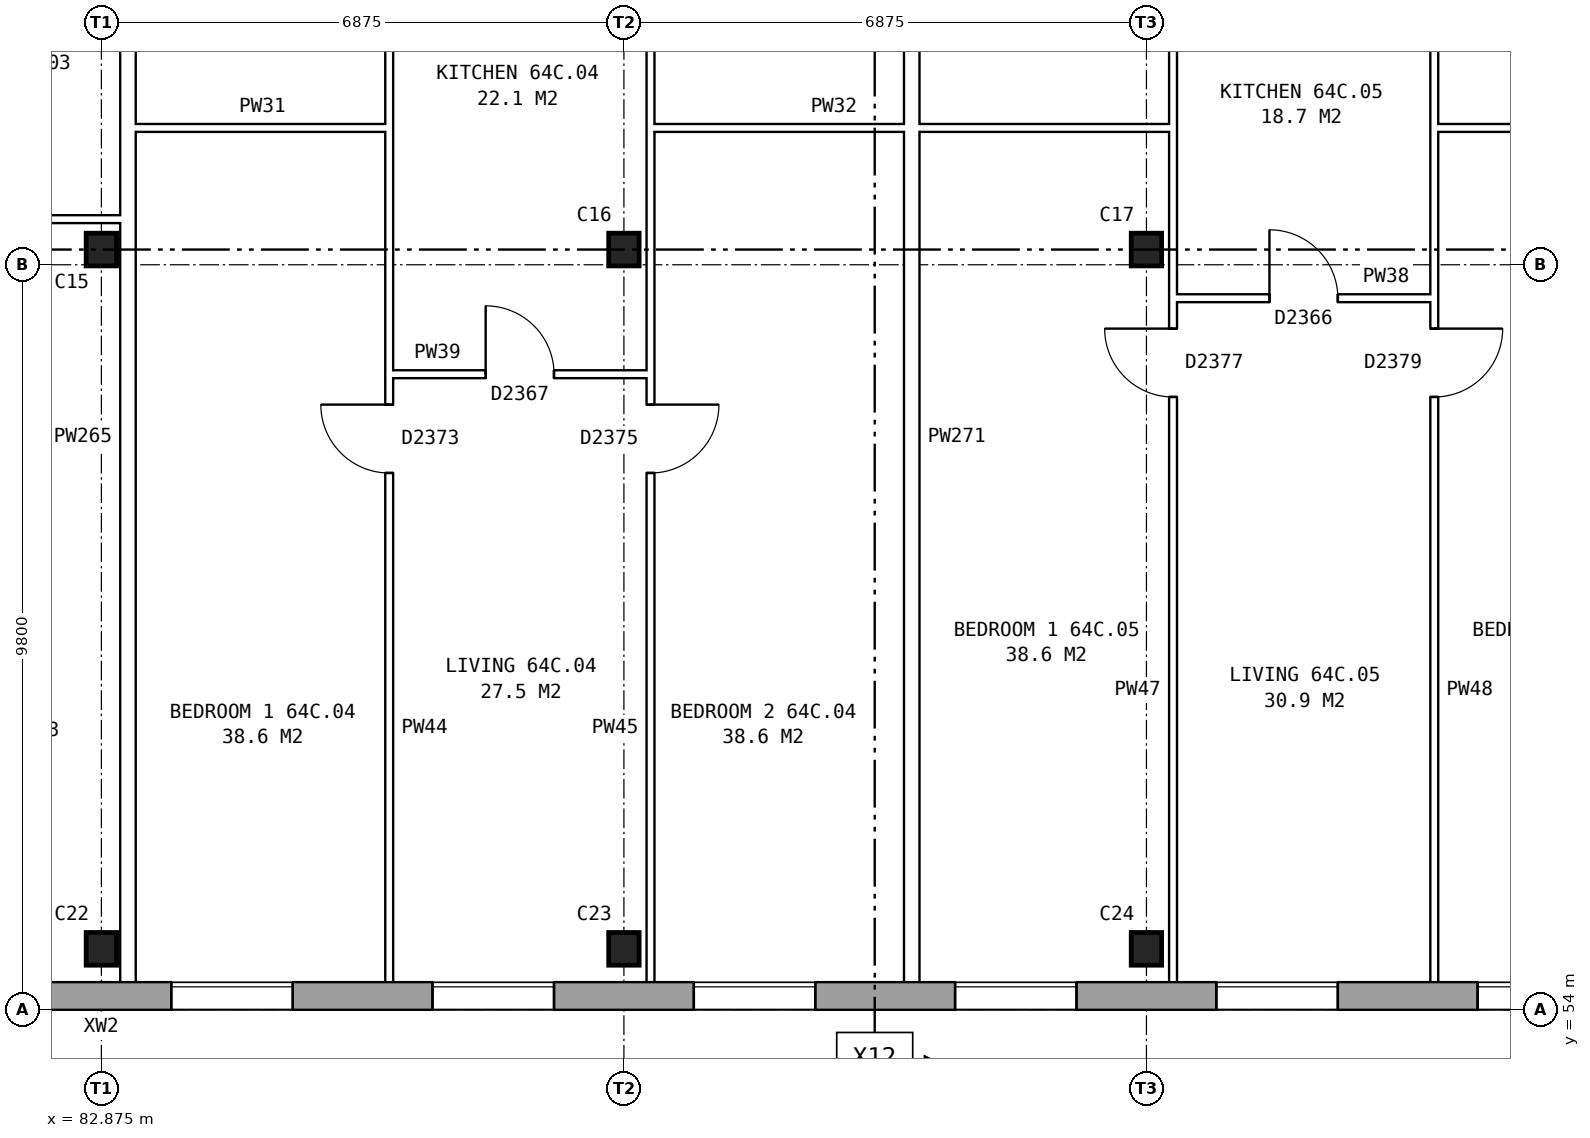
"""IFC4 building model, lengths in metres.
Left out: names, types, materials, properties, quantities, classifications, styles, units other than length and angle.
Written with IfcOpenShell. Run it as: python <this file> out.ifc"""

import sys

from ifc_helpers import new_model, si_unit, direction, frame, frame_2d, origin, origin_2d, place, context, subcontext, project, spatial, rectangle, i_section, extrude, element, fill, save


model = new_model("IFC4")
c1 = context("Model", 3, precision=1e-05, world=origin(), true_north=direction((0.0, 1.0)))
c2 = subcontext(c1, "Body", "Model", "MODEL_VIEW")
j1 = project(units=[si_unit("LENGTHUNIT", "METRE"), si_unit("PLANEANGLEUNIT", "RADIAN")], contexts=[c1])
p1 = place(None, origin())
s1 = spatial("IfcSite", under=j1, at=p1, CompositionType="ELEMENT")
p2 = place(p1, origin())
s2 = spatial("IfcBuilding", under=s1, at=p2, CompositionType="ELEMENT")
p3 = place(p2, frame((0.0, 0.0, 227.6)))
s3 = spatial("IfcBuildingStorey", under=s2, at=p3, CompositionType="ELEMENT", Elevation=227.6)
for number, where, z_axis, x_axis in (
    (1, (82.875, 54.8, 0.0), (0.0, 0.0, 1.0), (1.0, 0.0, 0.0)),
    (2, (89.75, 54.8, 0.0), (0.0, 0.0, 1.0), (1.0, 0.0, 0.0)),
    (3, (96.625, 54.8, 0.0), (0.0, 0.0, 1.0), (1.0, 0.0, 0.0)),
    (4, (82.875, 64.0, 0.0), (0.0, 0.0, 1.0), (1.0, 0.0, 0.0)),
    (5, (89.75, 64.0, 0.0), (0.0, 0.0, 1.0), (1.0, 0.0, 0.0)),
    (6, (96.625, 64.0, 0.0), (0.0, 0.0, 1.0), (1.0, 0.0, 0.0)),
):
    element("IfcColumn", number, at=place(p3, frame(where, z_axis=z_axis, x_axis=x_axis)), inside=s3, PredefinedType="COLUMN", context=c2, shape_type="SweptSolid", body=[
        extrude(i_section(OverallWidth=0.4, OverallDepth=0.43, WebThickness=0.04, FlangeThickness=0.04, at=origin_2d()), origin(), (0.0, 0.0, 1.0), 2.85),
    ])
p4 = place(p3, frame((75.95, 54.18, 0.0), z_axis=(0.0, 0.0, 1.0), x_axis=(1.0, 0.0, 0.0)))
e7 = element("IfcWall", 7, at=p4, inside=s3, PredefinedType="STANDARD", context=c2, shape_type="SweptSolid", body=[
    extrude(rectangle(XDim=55.1, YDim=0.36, at=frame_2d((27.55, 0.0))), origin(), (0.0, 0.0, 1.0), 2.85),
])
p5 = place(p4, frame((0.969, 0.0, 0.8)))
e8 = element("IfcOpeningElement", 8, at=p5, cuts=e7, PredefinedType="OPENING", context=c2, shape_type="SweptSolid", body=[
    extrude(rectangle(XDim=1.6, YDim=1.8, at=frame_2d((0.8, 0.9))), frame((0.0, 0.19, 0.0), z_axis=(0.0, -1.0, 0.0), x_axis=(1.0, 0.0, 0.0)), (0.0, 0.0, 1.0), 0.38),
])
p6 = place(p4, frame((4.406, 0.0, 0.8)))
e9 = element("IfcOpeningElement", 9, at=p6, cuts=e7, PredefinedType="OPENING", context=c2, shape_type="SweptSolid", body=[
    extrude(rectangle(XDim=1.6, YDim=1.8, at=frame_2d((0.8, 0.9))), frame((0.0, 0.19, 0.0), z_axis=(0.0, -1.0, 0.0), x_axis=(1.0, 0.0, 0.0)), (0.0, 0.0, 1.0), 0.38),
])
p7 = place(p4, frame((7.844, 0.0, 0.8)))
e10 = element("IfcOpeningElement", 10, at=p7, cuts=e7, PredefinedType="OPENING", context=c2, shape_type="SweptSolid", body=[
    extrude(rectangle(XDim=1.6, YDim=1.8, at=frame_2d((0.8, 0.9))), frame((0.0, 0.19, 0.0), z_axis=(0.0, -1.0, 0.0), x_axis=(1.0, 0.0, 0.0)), (0.0, 0.0, 1.0), 0.38),
])
p8 = place(p4, frame((11.281, 0.0, 0.8)))
e11 = element("IfcOpeningElement", 11, at=p8, cuts=e7, PredefinedType="OPENING", context=c2, shape_type="SweptSolid", body=[
    extrude(rectangle(XDim=1.6, YDim=1.8, at=frame_2d((0.8, 0.9))), frame((0.0, 0.19, 0.0), z_axis=(0.0, -1.0, 0.0), x_axis=(1.0, 0.0, 0.0)), (0.0, 0.0, 1.0), 0.38),
])
p9 = place(p4, frame((14.719, 0.0, 0.8)))
e12 = element("IfcOpeningElement", 12, at=p9, cuts=e7, PredefinedType="OPENING", context=c2, shape_type="SweptSolid", body=[
    extrude(rectangle(XDim=1.6, YDim=1.8, at=frame_2d((0.8, 0.9))), frame((0.0, 0.19, 0.0), z_axis=(0.0, -1.0, 0.0), x_axis=(1.0, 0.0, 0.0)), (0.0, 0.0, 1.0), 0.38),
])
p10 = place(p4, frame((18.156, 0.0, 0.8)))
e13 = element("IfcOpeningElement", 13, at=p10, cuts=e7, PredefinedType="OPENING", context=c2, shape_type="SweptSolid", body=[
    extrude(rectangle(XDim=1.6, YDim=1.8, at=frame_2d((0.8, 0.9))), frame((0.0, 0.19, 0.0), z_axis=(0.0, -1.0, 0.0), x_axis=(1.0, 0.0, 0.0)), (0.0, 0.0, 1.0), 0.38),
])
p11 = place(p4, frame((21.594, 0.0, 0.8)))
e14 = element("IfcOpeningElement", 14, at=p11, cuts=e7, PredefinedType="OPENING", context=c2, shape_type="SweptSolid", body=[
    extrude(rectangle(XDim=1.6, YDim=1.8, at=frame_2d((0.8, 0.9))), frame((0.0, 0.19, 0.0), z_axis=(0.0, -1.0, 0.0), x_axis=(1.0, 0.0, 0.0)), (0.0, 0.0, 1.0), 0.38),
])
p12 = place(p4, frame((25.031, 0.0, 0.8)))
e15 = element("IfcOpeningElement", 15, at=p12, cuts=e7, PredefinedType="OPENING", context=c2, shape_type="SweptSolid", body=[
    extrude(rectangle(XDim=1.6, YDim=1.8, at=frame_2d((0.8, 0.9))), frame((0.0, 0.19, 0.0), z_axis=(0.0, -1.0, 0.0), x_axis=(1.0, 0.0, 0.0)), (0.0, 0.0, 1.0), 0.38),
])
p13 = place(p4, frame((28.469, 0.0, 0.8)))
e16 = element("IfcOpeningElement", 16, at=p13, cuts=e7, PredefinedType="OPENING", context=c2, shape_type="SweptSolid", body=[
    extrude(rectangle(XDim=1.6, YDim=1.8, at=frame_2d((0.8, 0.9))), frame((0.0, 0.19, 0.0), z_axis=(0.0, -1.0, 0.0), x_axis=(1.0, 0.0, 0.0)), (0.0, 0.0, 1.0), 0.38),
])
p14 = place(p4, frame((31.906, 0.0, 0.8)))
e17 = element("IfcOpeningElement", 17, at=p14, cuts=e7, PredefinedType="OPENING", context=c2, shape_type="SweptSolid", body=[
    extrude(rectangle(XDim=1.6, YDim=1.8, at=frame_2d((0.8, 0.9))), frame((0.0, 0.19, 0.0), z_axis=(0.0, -1.0, 0.0), x_axis=(1.0, 0.0, 0.0)), (0.0, 0.0, 1.0), 0.38),
])
p15 = place(p4, frame((35.344, 0.0, 0.8)))
e18 = element("IfcOpeningElement", 18, at=p15, cuts=e7, PredefinedType="OPENING", context=c2, shape_type="SweptSolid", body=[
    extrude(rectangle(XDim=1.6, YDim=1.8, at=frame_2d((0.8, 0.9))), frame((0.0, 0.19, 0.0), z_axis=(0.0, -1.0, 0.0), x_axis=(1.0, 0.0, 0.0)), (0.0, 0.0, 1.0), 0.38),
])
p16 = place(p4, frame((38.781, 0.0, 0.8)))
e19 = element("IfcOpeningElement", 19, at=p16, cuts=e7, PredefinedType="OPENING", context=c2, shape_type="SweptSolid", body=[
    extrude(rectangle(XDim=1.6, YDim=1.8, at=frame_2d((0.8, 0.9))), frame((0.0, 0.19, 0.0), z_axis=(0.0, -1.0, 0.0), x_axis=(1.0, 0.0, 0.0)), (0.0, 0.0, 1.0), 0.38),
])
p17 = place(p4, frame((42.219, 0.0, 0.8)))
e20 = element("IfcOpeningElement", 20, at=p17, cuts=e7, PredefinedType="OPENING", context=c2, shape_type="SweptSolid", body=[
    extrude(rectangle(XDim=1.6, YDim=1.8, at=frame_2d((0.8, 0.9))), frame((0.0, 0.19, 0.0), z_axis=(0.0, -1.0, 0.0), x_axis=(1.0, 0.0, 0.0)), (0.0, 0.0, 1.0), 0.38),
])
p18 = place(p4, frame((45.656, 0.0, 0.8)))
e21 = element("IfcOpeningElement", 21, at=p18, cuts=e7, PredefinedType="OPENING", context=c2, shape_type="SweptSolid", body=[
    extrude(rectangle(XDim=1.6, YDim=1.8, at=frame_2d((0.8, 0.9))), frame((0.0, 0.19, 0.0), z_axis=(0.0, -1.0, 0.0), x_axis=(1.0, 0.0, 0.0)), (0.0, 0.0, 1.0), 0.38),
])
p19 = place(p4, frame((49.094, 0.0, 0.8)))
e22 = element("IfcOpeningElement", 22, at=p19, cuts=e7, PredefinedType="OPENING", context=c2, shape_type="SweptSolid", body=[
    extrude(rectangle(XDim=1.6, YDim=1.8, at=frame_2d((0.8, 0.9))), frame((0.0, 0.19, 0.0), z_axis=(0.0, -1.0, 0.0), x_axis=(1.0, 0.0, 0.0)), (0.0, 0.0, 1.0), 0.38),
])
p20 = place(p4, frame((52.531, 0.0, 0.8)))
e23 = element("IfcOpeningElement", 23, at=p20, cuts=e7, PredefinedType="OPENING", context=c2, shape_type="SweptSolid", body=[
    extrude(rectangle(XDim=1.6, YDim=1.8, at=frame_2d((0.8, 0.9))), frame((0.0, 0.19, 0.0), z_axis=(0.0, -1.0, 0.0), x_axis=(1.0, 0.0, 0.0)), (0.0, 0.0, 1.0), 0.38),
])
p21 = place(p3, frame((86.662, 62.36, 0.0), z_axis=(0.0, 0.0, 1.0), x_axis=(1.0, 0.0, 0.0)))
e24 = element("IfcWall", 24, at=p21, inside=s3, PredefinedType="PARTITIONING", context=c2, shape_type="SweptSolid", body=[
    extrude(rectangle(XDim=3.438, YDim=0.1, at=frame_2d((1.719, 0.0))), origin(), (0.0, 0.0, 1.0), 2.85),
])
p22 = place(p21, frame((1.269, 0.0, 0.0)))
e25 = element("IfcOpeningElement", 25, at=p22, cuts=e24, PredefinedType="OPENING", context=c2, shape_type="SweptSolid", body=[
    extrude(rectangle(XDim=0.9, YDim=2.1, at=frame_2d((0.45, 1.05))), frame((0.0, 0.06, 0.0), z_axis=(0.0, -1.0, 0.0), x_axis=(1.0, 0.0, 0.0)), (0.0, 0.0, 1.0), 0.12),
])
p23 = place(p3, frame((96.975, 63.36, 0.0), z_axis=(0.0, 0.0, 1.0), x_axis=(1.0, 0.0, 0.0)))
e26 = element("IfcWall", 26, at=p23, inside=s3, PredefinedType="PARTITIONING", context=c2, shape_type="SweptSolid", body=[
    extrude(rectangle(XDim=3.437, YDim=0.1, at=frame_2d((1.719, 0.0))), origin(), (0.0, 0.0, 1.0), 2.85),
])
p24 = place(p23, frame((1.269, 0.0, 0.0)))
e27 = element("IfcOpeningElement", 27, at=p24, cuts=e26, PredefinedType="OPENING", context=c2, shape_type="SweptSolid", body=[
    extrude(rectangle(XDim=0.9, YDim=2.1, at=frame_2d((0.45, 1.05))), frame((0.0, 0.06, 0.0), z_axis=(0.0, -1.0, 0.0), x_axis=(1.0, 0.0, 0.0)), (0.0, 0.0, 1.0), 0.12),
])
p25 = place(p3, frame((79.438, 64.4, 0.0), z_axis=(0.0, 0.0, 1.0), x_axis=(1.0, 0.0, 0.0)))
e28 = element("IfcWall", 28, at=p25, inside=s3, PredefinedType="PARTITIONING", context=c2, shape_type="SweptSolid", body=[
    extrude(rectangle(XDim=3.687, YDim=0.1, at=frame_2d((1.844, 0.0))), origin(), (0.0, 0.0, 1.0), 2.85),
])
p26 = place(p3, frame((83.325, 65.6, 0.0), z_axis=(0.0, 0.0, 1.0), x_axis=(1.0, 0.0, 0.0)))
e29 = element("IfcWall", 29, at=p26, inside=s3, PredefinedType="PARTITIONING", context=c2, shape_type="SweptSolid", body=[
    extrude(rectangle(XDim=3.337, YDim=0.1, at=frame_2d((1.668, 0.0))), origin(), (0.0, 0.0, 1.0), 2.85),
])
for number, where, z_axis, x_axis in (
    (30, (90.1, 65.6, 0.0), (0.0, 0.0, 1.0), (1.0, 0.0, 0.0)),
    (31, (100.412, 65.6, 0.0), (0.0, 0.0, 1.0), (1.0, 0.0, 0.0)),
):
    element("IfcWall", number, at=place(p3, frame(where, z_axis=z_axis, x_axis=x_axis)), inside=s3, PredefinedType="PARTITIONING", context=c2, shape_type="SweptSolid", body=[
        extrude(rectangle(XDim=6.875, YDim=0.1, at=frame_2d((3.438, 0.0))), origin(), (0.0, 0.0, 1.0), 2.85),
    ])
p27 = place(p3, frame((83.225, 54.36, 0.0), z_axis=(0.0, 0.0, 1.0), x_axis=(0.0, 1.0, 0.0)))
e32 = element("IfcWall", 32, at=p27, inside=s3, PredefinedType="PARTITIONING", context=c2, shape_type="SweptSolid", body=[
    extrude(rectangle(XDim=14.34, YDim=0.2, at=frame_2d((7.17, 0.0))), origin(), (0.0, 0.0, 1.0), 2.85),
])
p28 = place(p3, frame((86.662, 54.36, 0.0), z_axis=(0.0, 0.0, 1.0), x_axis=(0.0, 1.0, 0.0)))
e33 = element("IfcWall", 33, at=p28, inside=s3, PredefinedType="PARTITIONING", context=c2, shape_type="SweptSolid", body=[
    extrude(rectangle(XDim=14.34, YDim=0.1, at=frame_2d((7.17, 0.0))), origin(), (0.0, 0.0, 1.0), 2.85),
])
p29 = place(p28, frame((6.7, 0.0, 0.0)))
e34 = element("IfcOpeningElement", 34, at=p29, cuts=e33, PredefinedType="OPENING", context=c2, shape_type="SweptSolid", body=[
    extrude(rectangle(XDim=0.9, YDim=2.1, at=frame_2d((0.45, 1.05))), frame((0.0, 0.06, 0.0), z_axis=(0.0, -1.0, 0.0), x_axis=(1.0, 0.0, 0.0)), (0.0, 0.0, 1.0), 0.12),
])
p30 = place(p28, frame((13.04, 0.0, 0.0)))
e35 = element("IfcOpeningElement", 35, at=p30, cuts=e33, PredefinedType="OPENING", context=c2, shape_type="SweptSolid", body=[
    extrude(rectangle(XDim=0.9, YDim=2.1, at=frame_2d((0.45, 1.05))), frame((0.0, 0.06, 0.0), z_axis=(0.0, -1.0, 0.0), x_axis=(1.0, 0.0, 0.0)), (0.0, 0.0, 1.0), 0.12),
])
p31 = place(p3, frame((90.1, 54.36, 0.0), z_axis=(0.0, 0.0, 1.0), x_axis=(0.0, 1.0, 0.0)))
e36 = element("IfcWall", 36, at=p31, inside=s3, PredefinedType="PARTITIONING", context=c2, shape_type="SweptSolid", body=[
    extrude(rectangle(XDim=14.34, YDim=0.1, at=frame_2d((7.17, 0.0))), origin(), (0.0, 0.0, 1.0), 2.85),
])
p32 = place(p31, frame((6.7, 0.0, 0.0)))
e37 = element("IfcOpeningElement", 37, at=p32, cuts=e36, PredefinedType="OPENING", context=c2, shape_type="SweptSolid", body=[
    extrude(rectangle(XDim=0.9, YDim=2.1, at=frame_2d((0.45, 1.05))), frame((0.0, 0.06, 0.0), z_axis=(0.0, -1.0, 0.0), x_axis=(1.0, 0.0, 0.0)), (0.0, 0.0, 1.0), 0.12),
])
p33 = place(p31, frame((13.04, 0.0, 0.0)))
e38 = element("IfcOpeningElement", 38, at=p33, cuts=e36, PredefinedType="OPENING", context=c2, shape_type="SweptSolid", body=[
    extrude(rectangle(XDim=0.9, YDim=2.1, at=frame_2d((0.45, 1.05))), frame((0.0, 0.06, 0.0), z_axis=(0.0, -1.0, 0.0), x_axis=(1.0, 0.0, 0.0)), (0.0, 0.0, 1.0), 0.12),
])
p34 = place(p3, frame((93.537, 54.36, 0.0), z_axis=(0.0, 0.0, 1.0), x_axis=(0.0, 1.0, 0.0)))
e39 = element("IfcWall", 39, at=p34, inside=s3, PredefinedType="PARTITIONING", context=c2, shape_type="SweptSolid", body=[
    extrude(rectangle(XDim=14.34, YDim=0.2, at=frame_2d((7.17, 0.0))), origin(), (0.0, 0.0, 1.0), 2.85),
])
p35 = place(p3, frame((96.975, 54.36, 0.0), z_axis=(0.0, 0.0, 1.0), x_axis=(0.0, 1.0, 0.0)))
e40 = element("IfcWall", 40, at=p35, inside=s3, PredefinedType="PARTITIONING", context=c2, shape_type="SweptSolid", body=[
    extrude(rectangle(XDim=14.34, YDim=0.1, at=frame_2d((7.17, 0.0))), origin(), (0.0, 0.0, 1.0), 2.85),
])
p36 = place(p35, frame((7.7, 0.0, 0.0)))
e41 = element("IfcOpeningElement", 41, at=p36, cuts=e40, PredefinedType="OPENING", context=c2, shape_type="SweptSolid", body=[
    extrude(rectangle(XDim=0.9, YDim=2.1, at=frame_2d((0.45, 1.05))), frame((0.0, 0.06, 0.0), z_axis=(0.0, -1.0, 0.0), x_axis=(1.0, 0.0, 0.0)), (0.0, 0.0, 1.0), 0.12),
])
p37 = place(p35, frame((13.04, 0.0, 0.0)))
e42 = element("IfcOpeningElement", 42, at=p37, cuts=e40, PredefinedType="OPENING", context=c2, shape_type="SweptSolid", body=[
    extrude(rectangle(XDim=0.9, YDim=2.1, at=frame_2d((0.45, 1.05))), frame((0.0, 0.06, 0.0), z_axis=(0.0, -1.0, 0.0), x_axis=(1.0, 0.0, 0.0)), (0.0, 0.0, 1.0), 0.12),
])
p38 = place(p3, frame((100.412, 54.36, 0.0), z_axis=(0.0, 0.0, 1.0), x_axis=(0.0, 1.0, 0.0)))
e43 = element("IfcWall", 43, at=p38, inside=s3, PredefinedType="PARTITIONING", context=c2, shape_type="SweptSolid", body=[
    extrude(rectangle(XDim=14.34, YDim=0.1, at=frame_2d((7.17, 0.0))), origin(), (0.0, 0.0, 1.0), 2.85),
])
p39 = place(p38, frame((7.7, 0.0, 0.0)))
e44 = element("IfcOpeningElement", 44, at=p39, cuts=e43, PredefinedType="OPENING", context=c2, shape_type="SweptSolid", body=[
    extrude(rectangle(XDim=0.9, YDim=2.1, at=frame_2d((0.45, 1.05))), frame((0.0, 0.06, 0.0), z_axis=(0.0, -1.0, 0.0), x_axis=(1.0, 0.0, 0.0)), (0.0, 0.0, 1.0), 0.12),
])
p40 = place(p38, frame((13.04, 0.0, 0.0)))
e45 = element("IfcOpeningElement", 45, at=p40, cuts=e43, PredefinedType="OPENING", context=c2, shape_type="SweptSolid", body=[
    extrude(rectangle(XDim=0.9, YDim=2.1, at=frame_2d((0.45, 1.05))), frame((0.0, 0.06, 0.0), z_axis=(0.0, -1.0, 0.0), x_axis=(1.0, 0.0, 0.0)), (0.0, 0.0, 1.0), 0.12),
])
p41 = place(p7, origin())
e46 = element("IfcWindow", 46, at=p41, inside=s3, PartitioningType="SINGLE_PANEL", PredefinedType="WINDOW", context=c2, shape_type="SweptSolid", body=[
    extrude(rectangle(XDim=1.6, YDim=1.8, at=frame_2d((0.8, 0.9))), frame((0.0, 0.15, 0.0), z_axis=(0.0, -1.0, 0.0), x_axis=(1.0, 0.0, 0.0)), (0.0, 0.0, 1.0), 0.06),
])
fill(e10, e46)
p42 = place(p8, origin())
e47 = element("IfcWindow", 47, at=p42, inside=s3, PartitioningType="SINGLE_PANEL", PredefinedType="WINDOW", context=c2, shape_type="SweptSolid", body=[
    extrude(rectangle(XDim=1.6, YDim=1.8, at=frame_2d((0.8, 0.9))), frame((0.0, 0.15, 0.0), z_axis=(0.0, -1.0, 0.0), x_axis=(1.0, 0.0, 0.0)), (0.0, 0.0, 1.0), 0.06),
])
fill(e11, e47)
p43 = place(p9, origin())
e48 = element("IfcWindow", 48, at=p43, inside=s3, PartitioningType="SINGLE_PANEL", PredefinedType="WINDOW", context=c2, shape_type="SweptSolid", body=[
    extrude(rectangle(XDim=1.6, YDim=1.8, at=frame_2d((0.8, 0.9))), frame((0.0, 0.15, 0.0), z_axis=(0.0, -1.0, 0.0), x_axis=(1.0, 0.0, 0.0)), (0.0, 0.0, 1.0), 0.06),
])
fill(e12, e48)
p44 = place(p10, origin())
e49 = element("IfcWindow", 49, at=p44, inside=s3, PartitioningType="SINGLE_PANEL", PredefinedType="WINDOW", context=c2, shape_type="SweptSolid", body=[
    extrude(rectangle(XDim=1.6, YDim=1.8, at=frame_2d((0.8, 0.9))), frame((0.0, 0.15, 0.0), z_axis=(0.0, -1.0, 0.0), x_axis=(1.0, 0.0, 0.0)), (0.0, 0.0, 1.0), 0.06),
])
fill(e13, e49)
p45 = place(p11, origin())
e50 = element("IfcWindow", 50, at=p45, inside=s3, PartitioningType="SINGLE_PANEL", PredefinedType="WINDOW", context=c2, shape_type="SweptSolid", body=[
    extrude(rectangle(XDim=1.6, YDim=1.8, at=frame_2d((0.8, 0.9))), frame((0.0, 0.15, 0.0), z_axis=(0.0, -1.0, 0.0), x_axis=(1.0, 0.0, 0.0)), (0.0, 0.0, 1.0), 0.06),
])
fill(e14, e50)
p46 = place(p12, origin())
e51 = element("IfcWindow", 51, at=p46, inside=s3, PartitioningType="SINGLE_PANEL", PredefinedType="WINDOW", context=c2, shape_type="SweptSolid", body=[
    extrude(rectangle(XDim=1.6, YDim=1.8, at=frame_2d((0.8, 0.9))), frame((0.0, 0.15, 0.0), z_axis=(0.0, -1.0, 0.0), x_axis=(1.0, 0.0, 0.0)), (0.0, 0.0, 1.0), 0.06),
])
fill(e15, e51)
p47 = place(p29, origin())
e52 = element("IfcDoor", 52, at=p47, inside=s3, OperationType="SINGLE_SWING_RIGHT", PredefinedType="DOOR", context=c2, shape_type="SweptSolid", body=[
    extrude(rectangle(XDim=0.9, YDim=2.1, at=frame_2d((0.45, 1.05))), frame((0.0, 0.025, 0.0), z_axis=(0.0, -1.0, 0.0), x_axis=(1.0, 0.0, 0.0)), (0.0, 0.0, 1.0), 0.05),
])
fill(e34, e52)
p48 = place(p32, frame((0.9, 0.0, 0.0), z_axis=(0.0, 0.0, 1.0), x_axis=(-1.0, 0.0, 0.0)))
e53 = element("IfcDoor", 53, at=p48, inside=s3, OperationType="SINGLE_SWING_LEFT", PredefinedType="DOOR", context=c2, shape_type="SweptSolid", body=[
    extrude(rectangle(XDim=0.9, YDim=2.1, at=frame_2d((0.45, 1.05))), frame((0.0, 0.025, 0.0), z_axis=(0.0, -1.0, 0.0), x_axis=(1.0, 0.0, 0.0)), (0.0, 0.0, 1.0), 0.05),
])
fill(e37, e53)
p49 = place(p22, origin())
e54 = element("IfcDoor", 54, at=p49, inside=s3, OperationType="SINGLE_SWING_LEFT", PredefinedType="DOOR", context=c2, shape_type="SweptSolid", body=[
    extrude(rectangle(XDim=0.9, YDim=2.1, at=frame_2d((0.45, 1.05))), frame((0.0, 0.025, 0.0), z_axis=(0.0, -1.0, 0.0), x_axis=(1.0, 0.0, 0.0)), (0.0, 0.0, 1.0), 0.05),
])
fill(e25, e54)
p50 = place(p36, origin())
e55 = element("IfcDoor", 55, at=p50, inside=s3, OperationType="SINGLE_SWING_RIGHT", PredefinedType="DOOR", context=c2, shape_type="SweptSolid", body=[
    extrude(rectangle(XDim=0.9, YDim=2.1, at=frame_2d((0.45, 1.05))), frame((0.0, 0.025, 0.0), z_axis=(0.0, -1.0, 0.0), x_axis=(1.0, 0.0, 0.0)), (0.0, 0.0, 1.0), 0.05),
])
fill(e41, e55)
p51 = place(p39, frame((0.9, 0.0, 0.0), z_axis=(0.0, 0.0, 1.0), x_axis=(-1.0, 0.0, 0.0)))
e56 = element("IfcDoor", 56, at=p51, inside=s3, OperationType="SINGLE_SWING_LEFT", PredefinedType="DOOR", context=c2, shape_type="SweptSolid", body=[
    extrude(rectangle(XDim=0.9, YDim=2.1, at=frame_2d((0.45, 1.05))), frame((0.0, 0.025, 0.0), z_axis=(0.0, -1.0, 0.0), x_axis=(1.0, 0.0, 0.0)), (0.0, 0.0, 1.0), 0.05),
])
fill(e44, e56)
p52 = place(p24, origin())
e57 = element("IfcDoor", 57, at=p52, inside=s3, OperationType="SINGLE_SWING_LEFT", PredefinedType="DOOR", context=c2, shape_type="SweptSolid", body=[
    extrude(rectangle(XDim=0.9, YDim=2.1, at=frame_2d((0.45, 1.05))), frame((0.0, 0.025, 0.0), z_axis=(0.0, -1.0, 0.0), x_axis=(1.0, 0.0, 0.0)), (0.0, 0.0, 1.0), 0.05),
])
fill(e27, e57)
save(model, sys.argv[1])
